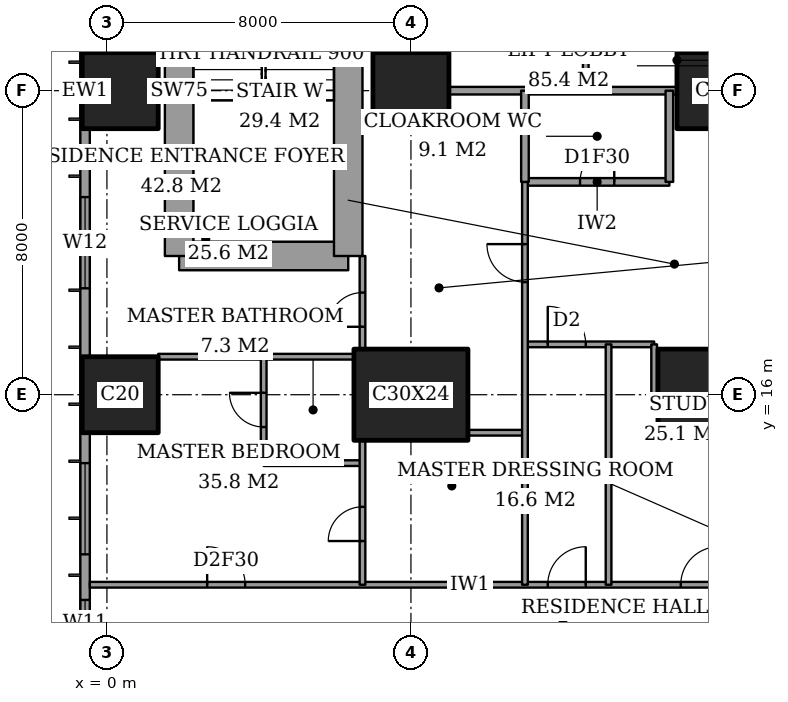
"""IFC4 building model, lengths in metres.
Left out: names, types, materials, properties, quantities, classifications, styles, units other than length and angle.
Written with IfcOpenShell. Run it as: python <this file> out.ifc"""

import sys

from ifc_helpers import new_model, si_unit, direction, frame, frame_2d, origin, origin_2d, place, context, subcontext, project, spatial, rectangle, extrude, element, fill, save


model = new_model("IFC4")
c1 = context("Model", 3, precision=1e-05, world=origin(), true_north=direction((0.0, 1.0)))
c2 = subcontext(c1, "Body", "Model", "MODEL_VIEW")
j1 = project(units=[si_unit("LENGTHUNIT", "METRE"), si_unit("PLANEANGLEUNIT", "RADIAN")], contexts=[c1])
p1 = place(None, origin())
s1 = spatial("IfcSite", under=j1, at=p1, CompositionType="ELEMENT")
p2 = place(p1, origin())
s2 = spatial("IfcBuilding", under=s1, at=p2, CompositionType="ELEMENT")
p3 = place(p2, frame((0.0, 0.0, 143.0)))
s3 = spatial("IfcBuildingStorey", under=s2, at=p3, CompositionType="ELEMENT", Elevation=143.0)
for number, where, z_axis, x_axis in (
    (1, (0.35, 16.0, 0.0), (0.0, 0.0, 1.0), (1.0, 0.0, 0.0)),
    (2, (0.35, 24.0, 0.0), (0.0, 0.0, 1.0), (1.0, 0.0, 0.0)),
):
    element("IfcColumn", number, at=place(p3, frame(where, z_axis=z_axis, x_axis=x_axis)), inside=s3, PredefinedType="COLUMN", context=c2, shape_type="SweptSolid", body=[
        extrude(rectangle(XDim=2.0, YDim=2.0, at=origin_2d()), origin(), (0.0, 0.0, 1.0), 3.6),
    ])
p4 = place(p3, frame((8.0, 16.0, 0.0), z_axis=(0.0, 0.0, 1.0), x_axis=(1.0, 0.0, 0.0)))
e3 = element("IfcColumn", 3, at=p4, inside=s3, PredefinedType="COLUMN", context=c2, shape_type="SweptSolid", body=[
    extrude(rectangle(XDim=3.0, YDim=2.4, at=origin_2d()), origin(), (0.0, 0.0, 1.0), 3.6),
])
p5 = place(p3, frame((8.0, 24.0, 0.0), z_axis=(0.0, 0.0, 1.0), x_axis=(1.0, 0.0, 0.0)))
e4 = element("IfcColumn", 4, at=p5, inside=s3, PredefinedType="COLUMN", context=c2, shape_type="SweptSolid", body=[
    extrude(rectangle(XDim=2.0, YDim=2.0, at=origin_2d()), origin(), (0.0, 0.0, 1.0), 3.6),
])
p6 = place(p3, frame((16.0, 16.0, 0.0), z_axis=(0.0, 0.0, 1.0), x_axis=(1.0, 0.0, 0.0)))
e5 = element("IfcColumn", 5, at=p6, inside=s3, PredefinedType="COLUMN", context=c2, shape_type="SweptSolid", body=[
    extrude(rectangle(XDim=3.0, YDim=2.4, at=origin_2d()), origin(), (0.0, 0.0, 1.0), 3.6),
])
p7 = place(p3, frame((16.0, 24.0, 0.0), z_axis=(0.0, 0.0, 1.0), x_axis=(1.0, 0.0, 0.0)))
e6 = element("IfcColumn", 6, at=p7, inside=s3, PredefinedType="COLUMN", context=c2, shape_type="SweptSolid", body=[
    extrude(rectangle(XDim=2.0, YDim=2.0, at=origin_2d()), origin(), (0.0, 0.0, 1.0), 3.6),
])
p8 = place(p3, frame((1.9, 19.65, 0.0), z_axis=(0.0, 0.0, 1.0), x_axis=(1.0, 0.0, 0.0)))
e7 = element("IfcWall", 7, at=p8, inside=s3, PredefinedType="SHEAR", context=c2, shape_type="SweptSolid", body=[
    extrude(rectangle(XDim=4.45, YDim=0.75, at=frame_2d((2.225, 0.0))), origin(), (0.0, 0.0, 1.0), 3.6),
])
p9 = place(p3, frame((6.35, 19.65, 0.0), z_axis=(0.0, 0.0, 1.0), x_axis=(0.0, 1.0, 0.0)))
e8 = element("IfcWall", 8, at=p9, inside=s3, PredefinedType="SHEAR", context=c2, shape_type="SweptSolid", body=[
    extrude(rectangle(XDim=8.7, YDim=0.75, at=frame_2d((4.35, 0.0))), origin(), (0.0, 0.0, 1.0), 3.6),
])
p10 = place(p9, frame((6.725, 0.0, 0.0)))
e9 = element("IfcOpeningElement", 9, at=p10, cuts=e8, PredefinedType="OPENING", context=c2, shape_type="SweptSolid", body=[
    extrude(rectangle(XDim=1.0, YDim=2.1, at=frame_2d((0.5, 1.05))), frame((0.0, 0.385, 0.0), z_axis=(0.0, -1.0, 0.0), x_axis=(1.0, 0.0, 0.0)), (0.0, 0.0, 1.0), 0.77),
])
p11 = place(p3, frame((1.9, 28.35, 0.0), z_axis=(0.0, 0.0, 1.0), x_axis=(0.0, -1.0, 0.0)))
e10 = element("IfcWall", 10, at=p11, inside=s3, PredefinedType="SHEAR", context=c2, shape_type="SweptSolid", body=[
    extrude(rectangle(XDim=8.7, YDim=0.75, at=frame_2d((4.35, 0.0))), origin(), (0.0, 0.0, 1.0), 3.6),
])
p12 = place(p3, frame((-0.575, 44.825, 0.0), z_axis=(0.0, 0.0, 1.0), x_axis=(0.0, -1.0, 0.0)))
e11 = element("IfcWall", 11, at=p12, inside=s3, PredefinedType="SOLIDWALL", context=c2, shape_type="SweptSolid", body=[
    extrude(rectangle(XDim=41.65, YDim=0.25, at=frame_2d((20.825, 0.0))), origin(), (0.0, 0.0, 1.0), 3.6),
])
p13 = place(p12, frame((0.775, 0.0, 0.4)))
e12 = element("IfcOpeningElement", 12, at=p13, cuts=e11, PredefinedType="OPENING", context=c2, shape_type="SweptSolid", body=[
    extrude(rectangle(XDim=2.4, YDim=2.2, at=frame_2d((1.2, 1.1))), frame((0.0, 0.135, 0.0), z_axis=(0.0, -1.0, 0.0), x_axis=(1.0, 0.0, 0.0)), (0.0, 0.0, 1.0), 0.27),
])
p14 = place(p12, frame((6.1, 0.0, 0.4)))
e13 = element("IfcOpeningElement", 13, at=p14, cuts=e11, PredefinedType="OPENING", context=c2, shape_type="SweptSolid", body=[
    extrude(rectangle(XDim=1.2, YDim=2.2, at=frame_2d((0.6, 1.1))), frame((0.0, 0.135, 0.0), z_axis=(0.0, -1.0, 0.0), x_axis=(1.0, 0.0, 0.0)), (0.0, 0.0, 1.0), 0.27),
])
p15 = place(p12, frame((8.425, 0.0, 0.4)))
e14 = element("IfcOpeningElement", 14, at=p15, cuts=e11, PredefinedType="OPENING", context=c2, shape_type="SweptSolid", body=[
    extrude(rectangle(XDim=2.4, YDim=2.2, at=frame_2d((1.2, 1.1))), frame((0.0, 0.135, 0.0), z_axis=(0.0, -1.0, 0.0), x_axis=(1.0, 0.0, 0.0)), (0.0, 0.0, 1.0), 0.27),
])
p16 = place(p12, frame((15.625, 0.0, 0.4)))
e15 = element("IfcOpeningElement", 15, at=p16, cuts=e11, PredefinedType="OPENING", context=c2, shape_type="SweptSolid", body=[
    extrude(rectangle(XDim=2.4, YDim=2.2, at=frame_2d((1.2, 1.1))), frame((0.0, 0.135, 0.0), z_axis=(0.0, -1.0, 0.0), x_axis=(1.0, 0.0, 0.0)), (0.0, 0.0, 1.0), 0.27),
])
p17 = place(p12, frame((23.625, 0.0, 0.4)))
e16 = element("IfcOpeningElement", 16, at=p17, cuts=e11, PredefinedType="OPENING", context=c2, shape_type="SweptSolid", body=[
    extrude(rectangle(XDim=2.4, YDim=2.2, at=frame_2d((1.2, 1.1))), frame((0.0, 0.135, 0.0), z_axis=(0.0, -1.0, 0.0), x_axis=(1.0, 0.0, 0.0)), (0.0, 0.0, 1.0), 0.27),
])
p18 = place(p12, frame((30.625, 0.0, 0.4)))
e17 = element("IfcOpeningElement", 17, at=p18, cuts=e11, PredefinedType="OPENING", context=c2, shape_type="SweptSolid", body=[
    extrude(rectangle(XDim=2.4, YDim=2.2, at=frame_2d((1.2, 1.1))), frame((0.0, 0.135, 0.0), z_axis=(0.0, -1.0, 0.0), x_axis=(1.0, 0.0, 0.0)), (0.0, 0.0, 1.0), 0.27),
])
p19 = place(p12, frame((34.225, 0.0, 0.4)))
e18 = element("IfcOpeningElement", 18, at=p19, cuts=e11, PredefinedType="OPENING", context=c2, shape_type="SweptSolid", body=[
    extrude(rectangle(XDim=1.2, YDim=2.2, at=frame_2d((0.6, 1.1))), frame((0.0, 0.135, 0.0), z_axis=(0.0, -1.0, 0.0), x_axis=(1.0, 0.0, 0.0)), (0.0, 0.0, 1.0), 0.27),
])
p20 = place(p12, frame((38.475, 0.0, 0.4)))
e19 = element("IfcOpeningElement", 19, at=p20, cuts=e11, PredefinedType="OPENING", context=c2, shape_type="SweptSolid", body=[
    extrude(rectangle(XDim=2.4, YDim=2.2, at=frame_2d((1.2, 1.1))), frame((0.0, 0.135, 0.0), z_axis=(0.0, -1.0, 0.0), x_axis=(1.0, 0.0, 0.0)), (0.0, 0.0, 1.0), 0.27),
])
p21 = place(p3, frame((-0.45, 11.0, 0.0), z_axis=(0.0, 0.0, 1.0), x_axis=(1.0, 0.0, 0.0)))
e20 = element("IfcWall", 20, at=p21, inside=s3, PredefinedType="PARTITIONING", context=c2, shape_type="SweptSolid", body=[
    extrude(rectangle(XDim=25.011, YDim=0.15, at=frame_2d((12.505, 0.0))), origin(), (0.0, 0.0, 1.0), 3.35),
])
p22 = place(p21, frame((12.05, 0.0, 0.0)))
e21 = element("IfcOpeningElement", 21, at=p22, cuts=e20, PredefinedType="OPENING", context=c2, shape_type="SweptSolid", body=[
    extrude(rectangle(XDim=1.0, YDim=2.1, at=frame_2d((0.5, 1.05))), frame((0.0, 0.085, 0.0), z_axis=(0.0, -1.0, 0.0), x_axis=(1.0, 0.0, 0.0)), (0.0, 0.0, 1.0), 0.17),
])
p23 = place(p21, frame((3.087, 0.0, 0.0)))
e22 = element("IfcOpeningElement", 22, at=p23, cuts=e20, PredefinedType="OPENING", context=c2, shape_type="SweptSolid", body=[
    extrude(rectangle(XDim=1.0, YDim=2.1, at=frame_2d((0.5, 1.05))), frame((0.0, 0.085, 0.0), z_axis=(0.0, -1.0, 0.0), x_axis=(1.0, 0.0, 0.0)), (0.0, 0.0, 1.0), 0.17),
])
p24 = place(p21, frame((15.55, 0.0, 0.0)))
e23 = element("IfcOpeningElement", 23, at=p24, cuts=e20, PredefinedType="OPENING", context=c2, shape_type="SweptSolid", body=[
    extrude(rectangle(XDim=1.0, YDim=2.1, at=frame_2d((0.5, 1.05))), frame((0.0, 0.085, 0.0), z_axis=(0.0, -1.0, 0.0), x_axis=(1.0, 0.0, 0.0)), (0.0, 0.0, 1.0), 0.17),
])
p25 = place(p21, frame((21.175, 0.0, 0.0)))
e24 = element("IfcOpeningElement", 24, at=p25, cuts=e20, PredefinedType="OPENING", context=c2, shape_type="SweptSolid", body=[
    extrude(rectangle(XDim=1.0, YDim=2.1, at=frame_2d((0.5, 1.05))), frame((0.0, 0.085, 0.0), z_axis=(0.0, -1.0, 0.0), x_axis=(1.0, 0.0, 0.0)), (0.0, 0.0, 1.0), 0.17),
])
p26 = place(p3, frame((4.125, 14.2, 0.0), z_axis=(0.0, 0.0, 1.0), x_axis=(1.0, 0.0, 0.0)))
e25 = element("IfcWall", 25, at=p26, inside=s3, PredefinedType="PARTITIONING", context=c2, shape_type="SweptSolid", body=[
    extrude(rectangle(XDim=2.6, YDim=0.15, at=frame_2d((1.3, 0.0))), origin(), (0.0, 0.0, 1.0), 3.35),
])
p27 = place(p3, frame((9.5, 15.0, 0.0), z_axis=(0.0, 0.0, 1.0), x_axis=(1.0, 0.0, 0.0)))
e26 = element("IfcWall", 26, at=p27, inside=s3, PredefinedType="PARTITIONING", context=c2, shape_type="SweptSolid", body=[
    extrude(rectangle(XDim=1.5, YDim=0.15, at=frame_2d((0.75, 0.0))), origin(), (0.0, 0.0, 1.0), 3.35),
])
p28 = place(p3, frame((1.35, 17.0, 0.0), z_axis=(0.0, 0.0, 1.0), x_axis=(1.0, 0.0, 0.0)))
e27 = element("IfcWall", 27, at=p28, inside=s3, PredefinedType="PARTITIONING", context=c2, shape_type="SweptSolid", body=[
    extrude(rectangle(XDim=5.15, YDim=0.15, at=frame_2d((2.575, 0.0))), origin(), (0.0, 0.0, 1.0), 3.35),
])
p29 = place(p3, frame((11.0, 17.325, 0.0), z_axis=(0.0, 0.0, 1.0), x_axis=(1.0, 0.0, 0.0)))
e28 = element("IfcWall", 28, at=p29, inside=s3, PredefinedType="PARTITIONING", context=c2, shape_type="SweptSolid", body=[
    extrude(rectangle(XDim=3.4, YDim=0.15, at=frame_2d((1.7, 0.0))), origin(), (0.0, 0.0, 1.0), 3.35),
])
p30 = place(p29, frame((0.6, 0.0, 0.0)))
e29 = element("IfcOpeningElement", 29, at=p30, cuts=e28, PredefinedType="OPENING", context=c2, shape_type="SweptSolid", body=[
    extrude(rectangle(XDim=1.0, YDim=2.1, at=frame_2d((0.5, 1.05))), frame((0.0, 0.085, 0.0), z_axis=(0.0, -1.0, 0.0), x_axis=(1.0, 0.0, 0.0)), (0.0, 0.0, 1.0), 0.17),
])
p31 = place(p3, frame((11.0, 21.6, 0.0), z_axis=(0.0, 0.0, 1.0), x_axis=(1.0, 0.0, 0.0)))
e30 = element("IfcWall", 30, at=p31, inside=s3, PredefinedType="PARTITIONING", context=c2, shape_type="SweptSolid", body=[
    extrude(rectangle(XDim=3.8, YDim=0.2, at=frame_2d((1.9, 0.0))), origin(), (0.0, 0.0, 1.0), 3.35),
])
p32 = place(p31, frame((1.45, 0.0, 0.0)))
e31 = element("IfcOpeningElement", 31, at=p32, cuts=e30, PredefinedType="OPENING", context=c2, shape_type="SweptSolid", body=[
    extrude(rectangle(XDim=0.9, YDim=2.1, at=frame_2d((0.45, 1.05))), frame((0.0, 0.11, 0.0), z_axis=(0.0, -1.0, 0.0), x_axis=(1.0, 0.0, 0.0)), (0.0, 0.0, 1.0), 0.22),
])
p33 = place(p3, frame((9.0, 24.0, 0.0), z_axis=(0.0, 0.0, 1.0), x_axis=(1.0, 0.0, 0.0)))
e32 = element("IfcWall", 32, at=p33, inside=s3, PredefinedType="PARTITIONING", context=c2, shape_type="SweptSolid", body=[
    extrude(rectangle(XDim=6.0, YDim=0.2, at=frame_2d((3.0, 0.0))), origin(), (0.0, 0.0, 1.0), 3.35),
])
p34 = place(p3, frame((4.125, 14.2, 0.0), z_axis=(0.0, 0.0, 1.0), x_axis=(0.0, 1.0, 0.0)))
e33 = element("IfcWall", 33, at=p34, inside=s3, PredefinedType="PARTITIONING", context=c2, shape_type="SweptSolid", body=[
    extrude(rectangle(XDim=2.8, YDim=0.15, at=frame_2d((1.4, 0.0))), origin(), (0.0, 0.0, 1.0), 3.35),
])
p35 = place(p34, frame((0.95, 0.0, 0.0)))
e34 = element("IfcOpeningElement", 34, at=p35, cuts=e33, PredefinedType="OPENING", context=c2, shape_type="SweptSolid", body=[
    extrude(rectangle(XDim=0.9, YDim=2.1, at=frame_2d((0.45, 1.05))), frame((0.0, 0.085, 0.0), z_axis=(0.0, -1.0, 0.0), x_axis=(1.0, 0.0, 0.0)), (0.0, 0.0, 1.0), 0.17),
])
p36 = place(p3, frame((6.725, 11.0, 0.0), z_axis=(0.0, 0.0, 1.0), x_axis=(0.0, 1.0, 0.0)))
e35 = element("IfcWall", 35, at=p36, inside=s3, PredefinedType="PARTITIONING", context=c2, shape_type="SweptSolid", body=[
    extrude(rectangle(XDim=3.8, YDim=0.15, at=frame_2d((1.9, 0.0))), origin(), (0.0, 0.0, 1.0), 3.35),
])
p37 = place(p36, frame((1.15, 0.0, 0.0)))
e36 = element("IfcOpeningElement", 36, at=p37, cuts=e35, PredefinedType="OPENING", context=c2, shape_type="SweptSolid", body=[
    extrude(rectangle(XDim=0.9, YDim=2.1, at=frame_2d((0.45, 1.05))), frame((0.0, 0.085, 0.0), z_axis=(0.0, -1.0, 0.0), x_axis=(1.0, 0.0, 0.0)), (0.0, 0.0, 1.0), 0.17),
])
p38 = place(p3, frame((6.725, 17.2, 0.0), z_axis=(0.0, 0.0, 1.0), x_axis=(0.0, 1.0, 0.0)))
e37 = element("IfcWall", 37, at=p38, inside=s3, PredefinedType="PARTITIONING", context=c2, shape_type="SweptSolid", body=[
    extrude(rectangle(XDim=2.45, YDim=0.15, at=frame_2d((1.225, 0.0))), origin(), (0.0, 0.0, 1.0), 3.35),
])
p39 = place(p38, frame((0.587, 0.0, 0.0)))
e38 = element("IfcOpeningElement", 38, at=p39, cuts=e37, PredefinedType="OPENING", context=c2, shape_type="SweptSolid", body=[
    extrude(rectangle(XDim=0.9, YDim=2.1, at=frame_2d((0.45, 1.05))), frame((0.0, 0.085, 0.0), z_axis=(0.0, -1.0, 0.0), x_axis=(1.0, 0.0, 0.0)), (0.0, 0.0, 1.0), 0.17),
])
p40 = place(p3, frame((11.0, 21.6, 0.0), z_axis=(0.0, 0.0, 1.0), x_axis=(0.0, 1.0, 0.0)))
e39 = element("IfcWall", 39, at=p40, inside=s3, PredefinedType="PARTITIONING", context=c2, shape_type="SweptSolid", body=[
    extrude(rectangle(XDim=2.4, YDim=0.2, at=frame_2d((1.2, 0.0))), origin(), (0.0, 0.0, 1.0), 3.35),
])
p41 = place(p3, frame((11.0, 11.0, 0.0), z_axis=(0.0, 0.0, 1.0), x_axis=(0.0, 1.0, 0.0)))
e40 = element("IfcWall", 40, at=p41, inside=s3, PredefinedType="PARTITIONING", context=c2, shape_type="SweptSolid", body=[
    extrude(rectangle(XDim=10.6, YDim=0.15, at=frame_2d((5.3, 0.0))), origin(), (0.0, 0.0, 1.0), 3.35),
])
p42 = place(p41, frame((7.962, 0.0, 0.0)))
e41 = element("IfcOpeningElement", 41, at=p42, cuts=e40, PredefinedType="OPENING", context=c2, shape_type="SweptSolid", body=[
    extrude(rectangle(XDim=1.0, YDim=2.1, at=frame_2d((0.5, 1.05))), frame((0.0, 0.085, 0.0), z_axis=(0.0, -1.0, 0.0), x_axis=(1.0, 0.0, 0.0)), (0.0, 0.0, 1.0), 0.17),
])
p43 = place(p3, frame((12.6, 24.0, 0.0), z_axis=(0.0, 0.0, 1.0), x_axis=(0.0, 1.0, 0.0)))
e42 = element("IfcWall", 42, at=p43, inside=s3, PredefinedType="PARTITIONING", context=c2, shape_type="SweptSolid", body=[
    extrude(rectangle(XDim=1.6, YDim=0.15, at=frame_2d((0.8, 0.0))), origin(), (0.0, 0.0, 1.0), 3.35),
])
p44 = place(p3, frame((13.2, 11.0, 0.0), z_axis=(0.0, 0.0, 1.0), x_axis=(0.0, 1.0, 0.0)))
e43 = element("IfcWall", 43, at=p44, inside=s3, PredefinedType="PARTITIONING", context=c2, shape_type="SweptSolid", body=[
    extrude(rectangle(XDim=6.325, YDim=0.15, at=frame_2d((3.163, 0.0))), origin(), (0.0, 0.0, 1.0), 3.35),
])
p45 = place(p3, frame((14.4, 15.875, 0.0), z_axis=(0.0, 0.0, 1.0), x_axis=(0.0, 1.0, 0.0)))
e44 = element("IfcWall", 44, at=p45, inside=s3, PredefinedType="PARTITIONING", context=c2, shape_type="SweptSolid", body=[
    extrude(rectangle(XDim=1.45, YDim=0.15, at=frame_2d((0.725, 0.0))), origin(), (0.0, 0.0, 1.0), 3.35),
])
p46 = place(p3, frame((14.8, 21.6, 0.0), z_axis=(0.0, 0.0, 1.0), x_axis=(0.0, 1.0, 0.0)))
e45 = element("IfcWall", 45, at=p46, inside=s3, PredefinedType="PARTITIONING", context=c2, shape_type="SweptSolid", body=[
    extrude(rectangle(XDim=2.4, YDim=0.2, at=frame_2d((1.2, 0.0))), origin(), (0.0, 0.0, 1.0), 3.35),
])
p47 = place(p17, origin())
e46 = element("IfcWindow", 46, at=p47, inside=s3, PartitioningType="SINGLE_PANEL", PredefinedType="WINDOW", context=c2, shape_type="SweptSolid", body=[
    extrude(rectangle(XDim=2.4, YDim=2.2, at=frame_2d((1.2, 1.1))), frame((0.0, 0.03, 0.0), z_axis=(0.0, -1.0, 0.0), x_axis=(1.0, 0.0, 0.0)), (0.0, 0.0, 1.0), 0.06),
])
fill(e16, e46)
p48 = place(p18, origin())
e47 = element("IfcWindow", 47, at=p48, inside=s3, PartitioningType="SINGLE_PANEL", PredefinedType="WINDOW", context=c2, shape_type="SweptSolid", body=[
    extrude(rectangle(XDim=2.4, YDim=2.2, at=frame_2d((1.2, 1.1))), frame((0.0, 0.03, 0.0), z_axis=(0.0, -1.0, 0.0), x_axis=(1.0, 0.0, 0.0)), (0.0, 0.0, 1.0), 0.06),
])
fill(e17, e47)
p49 = place(p19, origin())
e48 = element("IfcWindow", 48, at=p49, inside=s3, PartitioningType="SINGLE_PANEL", PredefinedType="WINDOW", context=c2, shape_type="SweptSolid", body=[
    extrude(rectangle(XDim=1.2, YDim=2.2, at=frame_2d((0.6, 1.1))), frame((0.0, 0.03, 0.0), z_axis=(0.0, -1.0, 0.0), x_axis=(1.0, 0.0, 0.0)), (0.0, 0.0, 1.0), 0.06),
])
fill(e18, e48)
p50 = place(p22, origin())
e49 = element("IfcDoor", 49, at=p50, inside=s3, OperationType="SINGLE_SWING_LEFT", PredefinedType="DOOR", context=c2, shape_type="SweptSolid", body=[
    extrude(rectangle(XDim=1.0, YDim=2.1, at=frame_2d((0.5, 1.05))), frame((0.0, 0.025, 0.0), z_axis=(0.0, -1.0, 0.0), x_axis=(1.0, 0.0, 0.0)), (0.0, 0.0, 1.0), 0.05),
])
fill(e21, e49)
p51 = place(p35, origin())
e50 = element("IfcDoor", 50, at=p51, inside=s3, OperationType="SINGLE_SWING_LEFT", PredefinedType="DOOR", context=c2, shape_type="SweptSolid", body=[
    extrude(rectangle(XDim=0.9, YDim=2.1, at=frame_2d((0.45, 1.05))), frame((0.0, 0.025, 0.0), z_axis=(0.0, -1.0, 0.0), x_axis=(1.0, 0.0, 0.0)), (0.0, 0.0, 1.0), 0.05),
])
fill(e34, e50)
p52 = place(p23, origin())
e51 = element("IfcDoor", 51, at=p52, inside=s3, OperationType="SINGLE_SWING_RIGHT", PredefinedType="DOOR", context=c2, shape_type="SweptSolid", body=[
    extrude(rectangle(XDim=1.0, YDim=2.1, at=frame_2d((0.5, 1.05))), frame((0.0, 0.025, 0.0), z_axis=(0.0, -1.0, 0.0), x_axis=(1.0, 0.0, 0.0)), (0.0, 0.0, 1.0), 0.05),
])
fill(e22, e51)
p53 = place(p39, origin())
e52 = element("IfcDoor", 52, at=p53, inside=s3, OperationType="SINGLE_SWING_RIGHT", PredefinedType="DOOR", context=c2, shape_type="SweptSolid", body=[
    extrude(rectangle(XDim=0.9, YDim=2.1, at=frame_2d((0.45, 1.05))), frame((0.0, 0.025, 0.0), z_axis=(0.0, -1.0, 0.0), x_axis=(1.0, 0.0, 0.0)), (0.0, 0.0, 1.0), 0.05),
])
fill(e38, e52)
p54 = place(p37, origin())
e53 = element("IfcDoor", 53, at=p54, inside=s3, OperationType="SINGLE_SWING_RIGHT", PredefinedType="DOOR", context=c2, shape_type="SweptSolid", body=[
    extrude(rectangle(XDim=0.9, YDim=2.1, at=frame_2d((0.45, 1.05))), frame((0.0, 0.025, 0.0), z_axis=(0.0, -1.0, 0.0), x_axis=(1.0, 0.0, 0.0)), (0.0, 0.0, 1.0), 0.05),
])
fill(e36, e53)
p55 = place(p42, origin())
e54 = element("IfcDoor", 54, at=p55, inside=s3, OperationType="SINGLE_SWING_LEFT", PredefinedType="DOOR", context=c2, shape_type="SweptSolid", body=[
    extrude(rectangle(XDim=1.0, YDim=2.1, at=frame_2d((0.5, 1.05))), frame((0.0, 0.025, 0.0), z_axis=(0.0, -1.0, 0.0), x_axis=(1.0, 0.0, 0.0)), (0.0, 0.0, 1.0), 0.05),
])
fill(e41, e54)
p56 = place(p32, origin())
e55 = element("IfcDoor", 55, at=p56, inside=s3, OperationType="SINGLE_SWING_LEFT", PredefinedType="DOOR", context=c2, shape_type="SweptSolid", body=[
    extrude(rectangle(XDim=0.9, YDim=2.1, at=frame_2d((0.45, 1.05))), frame((0.0, 0.025, 0.0), z_axis=(0.0, -1.0, 0.0), x_axis=(1.0, 0.0, 0.0)), (0.0, 0.0, 1.0), 0.05),
])
fill(e31, e55)
p57 = place(p30, origin())
e56 = element("IfcDoor", 56, at=p57, inside=s3, OperationType="SINGLE_SWING_RIGHT", PredefinedType="DOOR", context=c2, shape_type="SweptSolid", body=[
    extrude(rectangle(XDim=1.0, YDim=2.1, at=frame_2d((0.5, 1.05))), frame((0.0, 0.025, 0.0), z_axis=(0.0, -1.0, 0.0), x_axis=(1.0, 0.0, 0.0)), (0.0, 0.0, 1.0), 0.05),
])
fill(e29, e56)
p58 = place(p24, origin())
e57 = element("IfcDoor", 57, at=p58, inside=s3, OperationType="SINGLE_SWING_LEFT", PredefinedType="DOOR", context=c2, shape_type="SweptSolid", body=[
    extrude(rectangle(XDim=1.0, YDim=2.1, at=frame_2d((0.5, 1.05))), frame((0.0, 0.025, 0.0), z_axis=(0.0, -1.0, 0.0), x_axis=(1.0, 0.0, 0.0)), (0.0, 0.0, 1.0), 0.05),
])
fill(e23, e57)
save(model, sys.argv[1])
